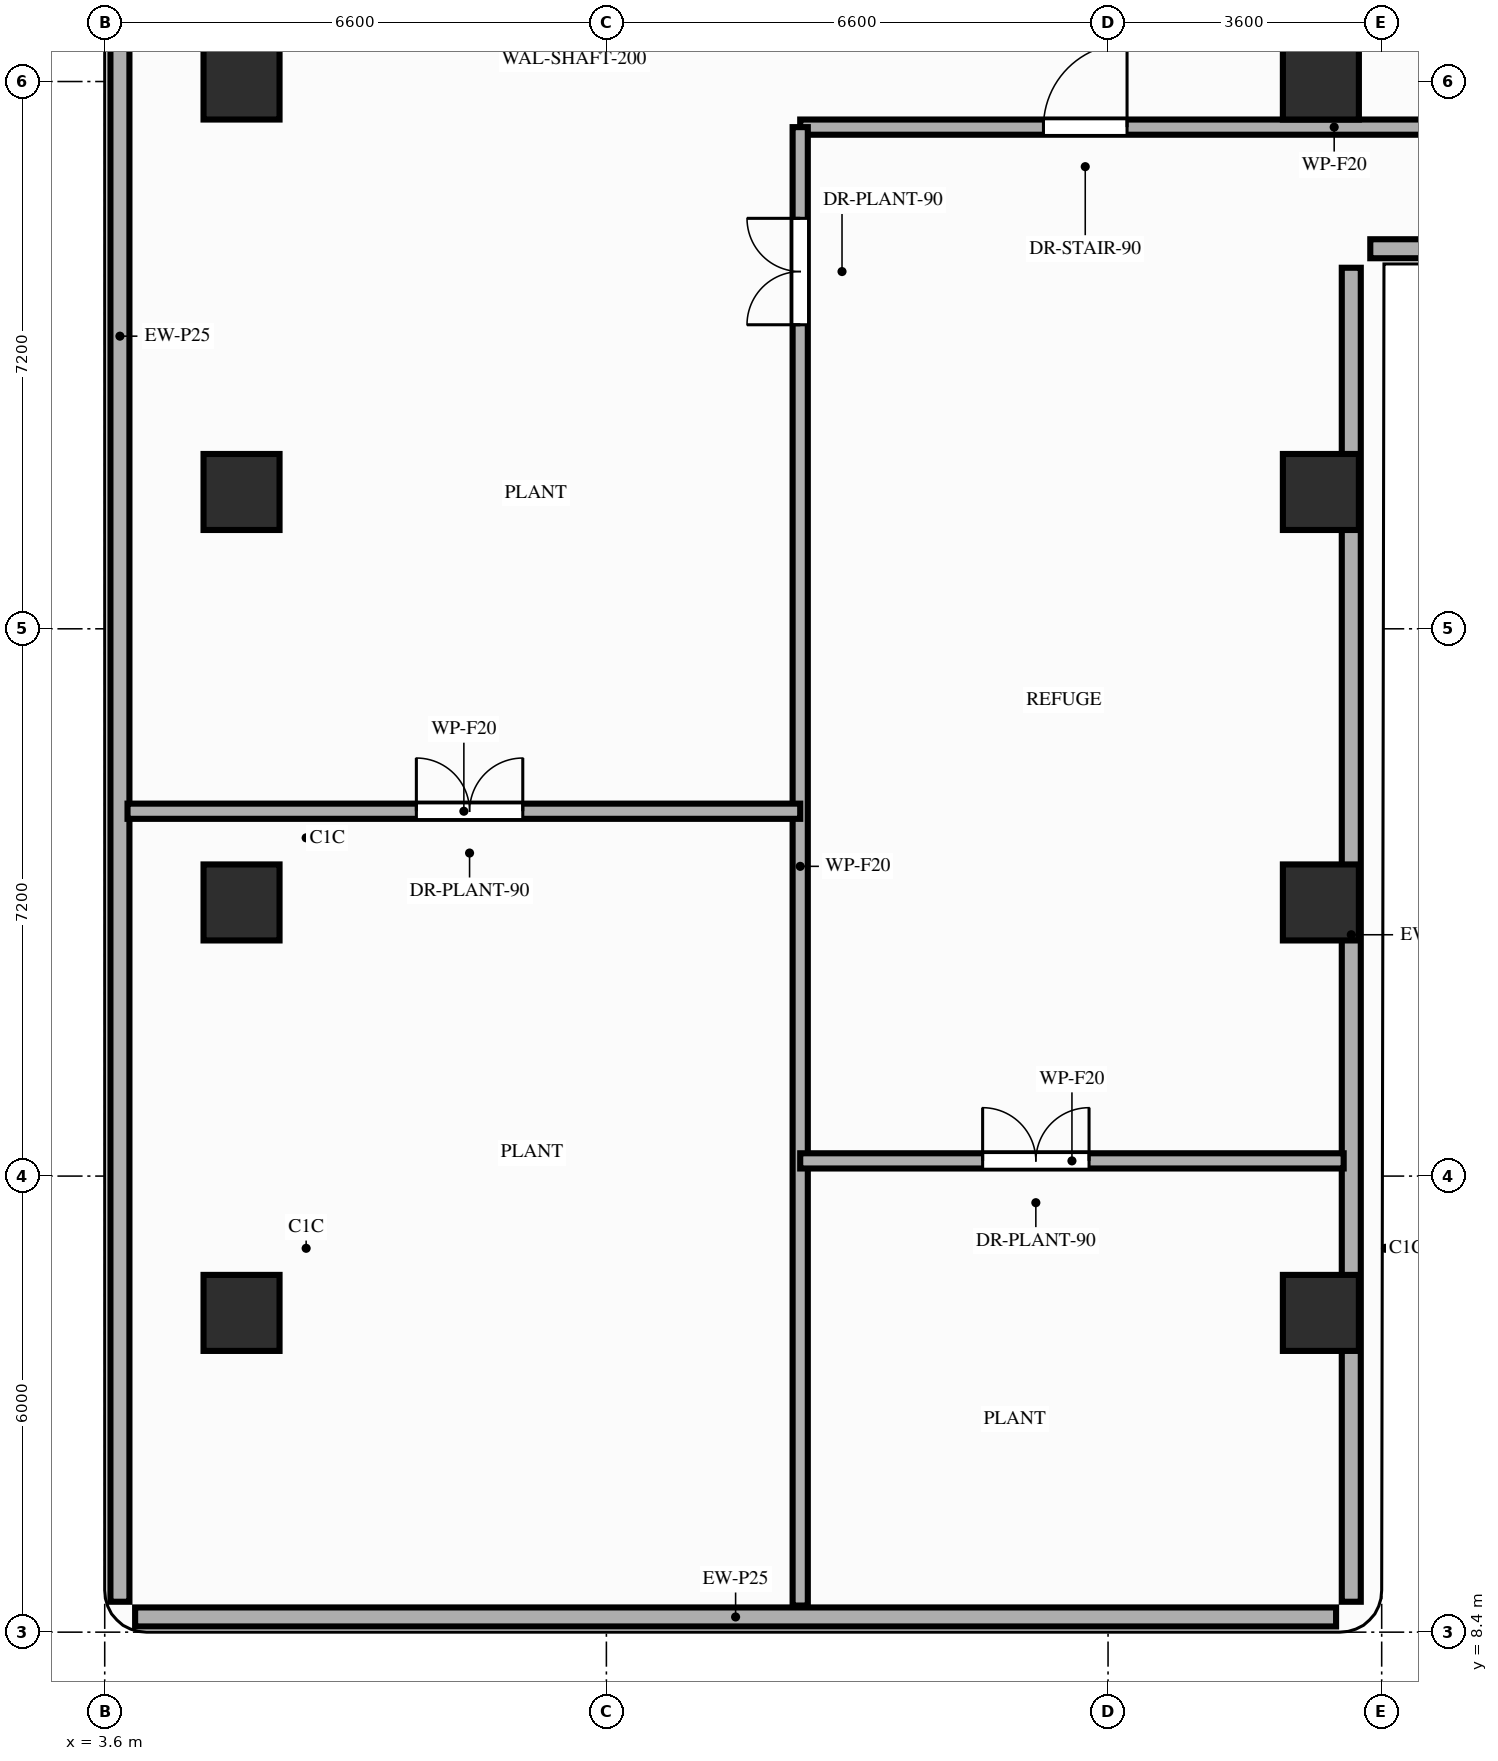
"""IFC4 building model, lengths in metres.
Left out: names, types, materials, properties, quantities, classifications, styles, units other than length and angle.
Written with IfcOpenShell. Run it as: python <this file> out.ifc"""

import sys

from ifc_helpers import new_model, si_unit, direction, frame, frame_2d, origin, origin_2d, place, context, subcontext, project, spatial, rectangle, extrude, element, fill, save


model = new_model("IFC4")
c1 = context("Model", 3, precision=1e-05, world=origin(), true_north=direction((0.0, 1.0)))
c2 = subcontext(c1, "Body", "Model", "MODEL_VIEW")
j1 = project(units=[si_unit("LENGTHUNIT", "METRE"), si_unit("PLANEANGLEUNIT", "RADIAN")], contexts=[c1])
p1 = place(None, origin())
s1 = spatial("IfcSite", under=j1, at=p1, CompositionType="ELEMENT")
p2 = place(p1, origin())
s2 = spatial("IfcBuilding", under=s1, at=p2, CompositionType="ELEMENT")
p3 = place(p2, frame((0.0, 0.0, 156.0)))
s3 = spatial("IfcBuildingStorey", under=s2, at=p3, CompositionType="ELEMENT", Elevation=156.0)
for number, where, z_axis, x_axis in (
    (1, (5.4, 12.6, 0.0), (0.0, 0.0, 1.0), (1.0, 0.0, 0.0)),
    (2, (19.6, 12.6, 0.0), (0.0, 0.0, 1.0), (1.0, 0.0, 0.0)),
    (3, (5.4, 18.0, 0.0), (0.0, 0.0, 1.0), (1.0, 0.0, 0.0)),
    (4, (19.6, 18.0, 0.0), (0.0, 0.0, 1.0), (1.0, 0.0, 0.0)),
    (5, (5.4, 23.4, 0.0), (0.0, 0.0, 1.0), (1.0, 0.0, 0.0)),
    (6, (19.6, 23.4, 0.0), (0.0, 0.0, 1.0), (1.0, 0.0, 0.0)),
    (7, (5.4, 28.8, 0.0), (0.0, 0.0, 1.0), (1.0, 0.0, 0.0)),
    (8, (19.6, 28.8, 0.0), (0.0, 0.0, 1.0), (1.0, 0.0, 0.0)),
):
    element("IfcColumn", number, at=place(p3, frame(where, z_axis=z_axis, x_axis=x_axis)), inside=s3, PredefinedType="COLUMN", context=c2, shape_type="SweptSolid", body=[
        extrude(rectangle(XDim=1.0, YDim=1.0, at=origin_2d()), origin(), (0.0, 0.0, 1.0), 4.0),
    ])
p4 = place(p3, frame((4.0, 8.6, 0.0), z_axis=(0.0, 0.0, 1.0), x_axis=(1.0, 0.0, 0.0)))
e9 = element("IfcWall", 9, at=p4, inside=s3, PredefinedType="STANDARD", context=c2, shape_type="SweptSolid", body=[
    extrude(rectangle(XDim=15.8, YDim=0.25, at=frame_2d((7.9, 0.0))), origin(), (0.0, 0.0, 1.0), 3.82),
])
p5 = place(p3, frame((3.8, 42.1, 0.0), z_axis=(0.0, 0.0, 1.0), x_axis=(0.0, -1.0, 0.0)))
e10 = element("IfcWall", 10, at=p5, inside=s3, PredefinedType="STANDARD", context=c2, shape_type="SweptSolid", body=[
    extrude(rectangle(XDim=33.3, YDim=0.25, at=frame_2d((16.65, 0.0))), origin(), (0.0, 0.0, 1.0), 3.51),
])
p6 = place(p3, frame((20.0, 8.8, 0.0), z_axis=(0.0, 0.0, 1.0), x_axis=(0.0, 1.0, 0.0)))
e11 = element("IfcWall", 11, at=p6, inside=s3, PredefinedType="STANDARD", context=c2, shape_type="SweptSolid", body=[
    extrude(rectangle(XDim=17.55, YDim=0.25, at=frame_2d((8.775, 0.0))), origin(), (0.0, 0.0, 1.0), 3.25),
])
p7 = place(p3, frame((20.25, 26.6, 0.0), z_axis=(0.0, 0.0, 1.0), x_axis=(1.0, 0.0, 0.0)))
e12 = element("IfcWall", 12, at=p7, inside=s3, PredefinedType="STANDARD", context=c2, shape_type="SweptSolid", body=[
    extrude(rectangle(XDim=26.15, YDim=0.25, at=frame_2d((13.075, 0.0))), origin(), (0.0, 0.0, 1.0), 3.82),
])
p8 = place(p3, frame((12.75, 28.2, 0.0), z_axis=(0.0, 0.0, 1.0), x_axis=(1.0, 0.0, 0.0)))
e13 = element("IfcWall", 13, at=p8, inside=s3, PredefinedType="PARTITIONING", context=c2, shape_type="SweptSolid", body=[
    extrude(rectangle(XDim=14.05, YDim=0.2, at=frame_2d((7.025, 0.0))), origin(), (0.0, 0.0, 1.0), 3.25),
])
p9 = place(p8, frame((3.2, 0.0, 0.0)))
e14 = element("IfcOpeningElement", 14, at=p9, cuts=e13, PredefinedType="OPENING", context=c2, shape_type="SweptSolid", body=[
    extrude(rectangle(XDim=1.1, YDim=2.15, at=frame_2d((0.55, 1.075))), frame((0.0, 0.11, 0.0), z_axis=(0.0, -1.0, 0.0), x_axis=(1.0, 0.0, 0.0)), (0.0, 0.0, 1.0), 0.22),
])
p10 = place(p3, frame((12.75, 8.75, 0.0), z_axis=(0.0, 0.0, 1.0), x_axis=(0.0, 1.0, 0.0)))
e15 = element("IfcWall", 15, at=p10, inside=s3, PredefinedType="PARTITIONING", context=c2, shape_type="SweptSolid", body=[
    extrude(rectangle(XDim=19.45, YDim=0.2, at=frame_2d((9.725, 0.0))), origin(), (0.0, 0.0, 1.0), 3.25),
])
p11 = place(p10, frame((16.85, 0.0, 0.0)))
e16 = element("IfcOpeningElement", 16, at=p11, cuts=e15, PredefinedType="OPENING", context=c2, shape_type="SweptSolid", body=[
    extrude(rectangle(XDim=1.4, YDim=2.2, at=frame_2d((0.7, 1.1))), frame((0.0, 0.11, 0.0), z_axis=(0.0, -1.0, 0.0), x_axis=(1.0, 0.0, 0.0)), (0.0, 0.0, 1.0), 0.22),
])
p12 = place(p3, frame((12.75, 14.6, 0.0), z_axis=(0.0, 0.0, 1.0), x_axis=(1.0, 0.0, 0.0)))
e17 = element("IfcWall", 17, at=p12, inside=s3, PredefinedType="PARTITIONING", context=c2, shape_type="SweptSolid", body=[
    extrude(rectangle(XDim=7.15, YDim=0.2, at=frame_2d((3.575, 0.0))), origin(), (0.0, 0.0, 1.0), 3.25),
])
p13 = place(p12, frame((2.4, 0.0, 0.0)))
e18 = element("IfcOpeningElement", 18, at=p13, cuts=e17, PredefinedType="OPENING", context=c2, shape_type="SweptSolid", body=[
    extrude(rectangle(XDim=1.4, YDim=2.2, at=frame_2d((0.7, 1.1))), frame((0.0, 0.11, 0.0), z_axis=(0.0, -1.0, 0.0), x_axis=(1.0, 0.0, 0.0)), (0.0, 0.0, 1.0), 0.22),
])
p14 = place(p3, frame((3.9, 19.2, 0.0), z_axis=(0.0, 0.0, 1.0), x_axis=(1.0, 0.0, 0.0)))
e19 = element("IfcWall", 19, at=p14, inside=s3, PredefinedType="PARTITIONING", context=c2, shape_type="SweptSolid", body=[
    extrude(rectangle(XDim=8.85, YDim=0.2, at=frame_2d((4.425, 0.0))), origin(), (0.0, 0.0, 1.0), 3.25),
])
p15 = place(p14, frame((3.8, 0.0, 0.0)))
e20 = element("IfcOpeningElement", 20, at=p15, cuts=e19, PredefinedType="OPENING", context=c2, shape_type="SweptSolid", body=[
    extrude(rectangle(XDim=1.4, YDim=2.2, at=frame_2d((0.7, 1.1))), frame((0.0, 0.11, 0.0), z_axis=(0.0, -1.0, 0.0), x_axis=(1.0, 0.0, 0.0)), (0.0, 0.0, 1.0), 0.22),
])
p16 = place(p9, origin())
e21 = element("IfcDoor", 21, at=p16, inside=s3, OperationType="SINGLE_SWING_RIGHT", PredefinedType="DOOR", context=c2, shape_type="SweptSolid", body=[
    extrude(rectangle(XDim=1.1, YDim=2.15, at=frame_2d((0.55, 1.075))), frame((0.0, 0.025, 0.0), z_axis=(0.0, -1.0, 0.0), x_axis=(1.0, 0.0, 0.0)), (0.0, 0.0, 1.0), 0.05),
])
fill(e14, e21)
p17 = place(p11, origin())
e22 = element("IfcDoor", 22, at=p17, inside=s3, OperationType="DOUBLE_DOOR_SINGLE_SWING", PredefinedType="DOOR", context=c2, shape_type="SweptSolid", body=[
    extrude(rectangle(XDim=1.4, YDim=2.2, at=frame_2d((0.7, 1.1))), frame((0.0, 0.025, 0.0), z_axis=(0.0, -1.0, 0.0), x_axis=(1.0, 0.0, 0.0)), (0.0, 0.0, 1.0), 0.05),
])
fill(e16, e22)
p18 = place(p15, origin())
e23 = element("IfcDoor", 23, at=p18, inside=s3, OperationType="DOUBLE_DOOR_SINGLE_SWING", PredefinedType="DOOR", context=c2, shape_type="SweptSolid", body=[
    extrude(rectangle(XDim=1.4, YDim=2.2, at=frame_2d((0.7, 1.1))), frame((0.0, 0.025, 0.0), z_axis=(0.0, -1.0, 0.0), x_axis=(1.0, 0.0, 0.0)), (0.0, 0.0, 1.0), 0.05),
])
fill(e20, e23)
p19 = place(p13, origin())
e24 = element("IfcDoor", 24, at=p19, inside=s3, OperationType="DOUBLE_DOOR_SINGLE_SWING", PredefinedType="DOOR", context=c2, shape_type="SweptSolid", body=[
    extrude(rectangle(XDim=1.4, YDim=2.2, at=frame_2d((0.7, 1.1))), frame((0.0, 0.025, 0.0), z_axis=(0.0, -1.0, 0.0), x_axis=(1.0, 0.0, 0.0)), (0.0, 0.0, 1.0), 0.05),
])
fill(e18, e24)
save(model, sys.argv[1])
